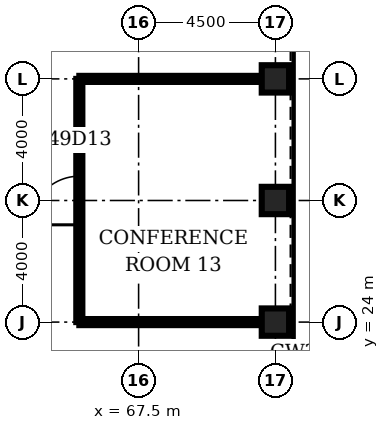
"""IFC4 building model, lengths in metres.
Left out: names, types, materials, properties, quantities, classifications, styles, units other than length and angle.
Written with IfcOpenShell. Run it as: python <this file> out.ifc"""

import sys

from ifc_helpers import new_model, si_unit, direction, frame, frame_2d, origin, origin_2d, place, context, subcontext, project, spatial, rectangle, hollow_rectangle, extrude, element, fill, save


model = new_model("IFC4")
c1 = context("Model", 3, precision=1e-05, world=origin(), true_north=direction((0.0, 1.0)))
c2 = subcontext(c1, "Body", "Model", "MODEL_VIEW")
j1 = project(units=[si_unit("LENGTHUNIT", "METRE"), si_unit("PLANEANGLEUNIT", "RADIAN")], contexts=[c1])
p1 = place(None, origin())
s1 = spatial("IfcSite", under=j1, at=p1, CompositionType="ELEMENT")
p2 = place(p1, origin())
s2 = spatial("IfcBuilding", under=s1, at=p2, CompositionType="ELEMENT")
p3 = place(p2, frame((0.0, 0.0, 219.4)))
s3 = spatial("IfcBuildingStorey", under=s2, at=p3, CompositionType="ELEMENT", Elevation=219.4)
for number, where, z_axis, x_axis in (
    (1, (72.0, 24.0, 0.0), (0.0, 0.0, 1.0), (1.0, 0.0, 0.0)),
    (2, (72.0, 28.0, 0.0), (0.0, 0.0, 1.0), (1.0, 0.0, 0.0)),
    (3, (72.0, 32.0, 0.0), (0.0, 0.0, 1.0), (1.0, 0.0, 0.0)),
):
    element("IfcColumn", number, at=place(p3, frame(where, z_axis=z_axis, x_axis=x_axis)), inside=s3, PredefinedType="COLUMN", context=c2, shape_type="SweptSolid", body=[
        extrude(hollow_rectangle(XDim=0.9, YDim=0.9, WallThickness=0.08, at=origin_2d()), origin(), (0.0, 0.0, 1.0), 4.2),
    ])
for number, where, z_axis, x_axis in (
    (4, (65.55, 24.0, 0.0), (0.0, 0.0, 1.0), (1.0, 0.0, 0.0)),
    (5, (65.55, 32.0, 0.0), (0.0, 0.0, 1.0), (1.0, 0.0, 0.0)),
):
    element("IfcWall", number, at=place(p3, frame(where, z_axis=z_axis, x_axis=x_axis)), inside=s3, PredefinedType="PARTITIONING", context=c2, shape_type="SweptSolid", body=[
        extrude(rectangle(XDim=6.0, YDim=0.2, at=frame_2d((3.0, 0.0))), origin(), (0.0, 0.0, 1.0), 3.0),
    ])
p4 = place(p3, frame((65.55, 24.0, 0.0), z_axis=(0.0, 0.0, 1.0), x_axis=(0.0, 1.0, 0.0)))
e6 = element("IfcWall", 6, at=p4, inside=s3, PredefinedType="PARTITIONING", context=c2, shape_type="SweptSolid", body=[
    extrude(rectangle(XDim=8.0, YDim=0.2, at=frame_2d((4.0, 0.0))), origin(), (0.0, 0.0, 1.0), 3.0),
])
p5 = place(p4, frame((3.2, 0.0, 0.0)))
e7 = element("IfcOpeningElement", 7, at=p5, cuts=e6, PredefinedType="OPENING", context=c2, shape_type="SweptSolid", body=[
    extrude(rectangle(XDim=1.6, YDim=2.1, at=frame_2d((0.8, 1.05))), frame((0.0, 0.11, 0.0), z_axis=(0.0, -1.0, 0.0), x_axis=(1.0, 0.0, 0.0)), (0.0, 0.0, 1.0), 0.22),
])
p6 = place(p5, origin())
e8 = element("IfcDoor", 8, at=p6, inside=s3, OperationType="SINGLE_SWING_LEFT", PredefinedType="DOOR", context=c2, shape_type="SweptSolid", body=[
    extrude(rectangle(XDim=1.6, YDim=2.1, at=frame_2d((0.8, 1.05))), frame((0.0, 0.025, 0.0), z_axis=(0.0, -1.0, 0.0), x_axis=(1.0, 0.0, 0.0)), (0.0, 0.0, 1.0), 0.05),
])
fill(e7, e8)
save(model, sys.argv[1])
